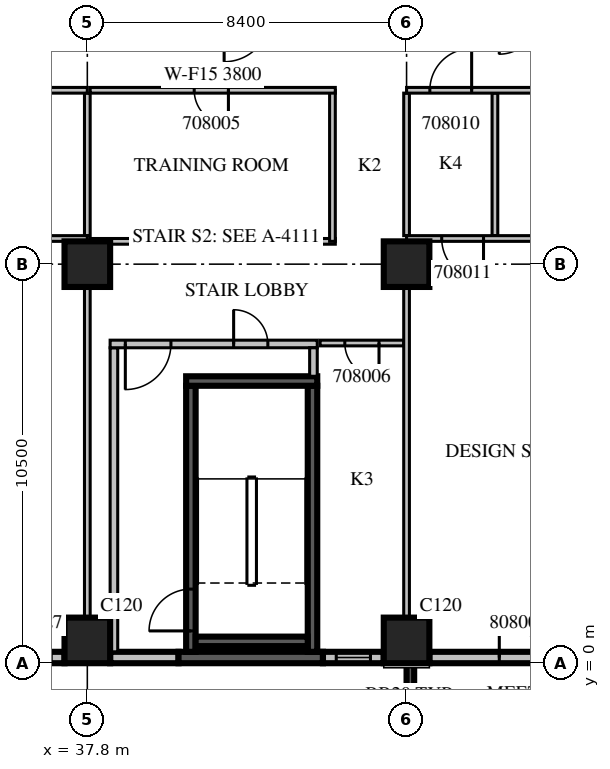
"""IFC4 building model, lengths in metres.
Left out: names, types, materials, properties, quantities, classifications, styles, units other than length and angle.
Written with IfcOpenShell. Run it as: python <this file> out.ifc"""

import sys

from ifc_helpers import new_model, si_unit, direction, frame, frame_2d, origin, origin_2d, place, context, subcontext, project, spatial, rectangle, extrude, source, transform, mapped, element, fill, save


model = new_model("IFC4")
c1 = context("Model", 3, precision=1e-05, world=origin(), true_north=direction((0.0, 1.0)))
c2 = subcontext(c1, "Body", "Model", "MODEL_VIEW")
j1 = project(units=[si_unit("LENGTHUNIT", "METRE"), si_unit("PLANEANGLEUNIT", "RADIAN")], contexts=[c1])
p1 = place(None, origin())
s1 = spatial("IfcSite", under=j1, at=p1, CompositionType="ELEMENT")
p2 = place(p1, origin())
s2 = spatial("IfcBuilding", under=s1, at=p2, CompositionType="ELEMENT")
p3 = place(p2, frame((0.0, 0.0, 44.7)))
s3 = spatial("IfcBuildingStorey", under=s2, at=p3, CompositionType="ELEMENT", Elevation=44.7)
m1 = source(origin(), c2, "Body", "SweptSolid", [
    extrude(rectangle(XDim=1.2, YDim=1.2, at=origin_2d()), origin(), (0.0, 0.0, 1.0), 4.2),
])
for number, where, z_axis, x_axis in (
    (1, (37.8, 0.6, 0.0), (0.0, 0.0, 1.0), (1.0, 0.0, 0.0)),
    (2, (46.2, 0.6, 0.0), (0.0, 0.0, 1.0), (1.0, 0.0, 0.0)),
    (3, (37.8, 10.5, 0.0), (0.0, 0.0, 1.0), (1.0, 0.0, 0.0)),
    (4, (46.2, 10.5, 0.0), (0.0, 0.0, 1.0), (1.0, 0.0, 0.0)),
):
    element("IfcColumn", number, at=place(p3, frame(where, z_axis=z_axis, x_axis=x_axis)), inside=s3, PredefinedType="COLUMN", context=c2, shape_type="MappedRepresentation", body=[
        mapped(m1, transform((0.0, 0.0, 0.0), scale=1.0)),
    ])
m2 = source(origin(), c2, "Body", "SweptSolid", [
    extrude(rectangle(XDim=1.6, YDim=0.3, at=frame_2d((0.8, 0.0))), origin(), (0.0, 0.0, 1.0), 3.8),
])
p4 = place(p3, frame((35.6, 0.15, 0.0), z_axis=(0.0, 0.0, 1.0), x_axis=(1.0, 0.0, 0.0)))
e5 = element("IfcWall", 5, at=p4, inside=s3, PredefinedType="STANDARD", context=c2, shape_type="MappedRepresentation", body=[
    mapped(m2, transform((0.0, 0.0, 0.0), scale=1.0)),
])
m3 = source(origin(), c2, "Body", "SweptSolid", [
    extrude(rectangle(XDim=0.9, YDim=2.7, at=frame_2d((0.45, 1.35))), frame((0.0, 0.16, 0.0), z_axis=(0.0, -1.0, 0.0), x_axis=(1.0, 0.0, 0.0)), (0.0, 0.0, 1.0), 0.32),
])
p5 = place(p4, frame((0.35, 0.0, 0.6)))
e6 = element("IfcOpeningElement", 6, at=p5, cuts=e5, PredefinedType="OPENING", context=c2, shape_type="MappedRepresentation", body=[
    mapped(m3, transform((0.0, 0.0, 0.0), scale=1.0)),
])
m4 = source(origin(), c2, "Body", "SweptSolid", [
    extrude(rectangle(XDim=1.8, YDim=0.3, at=frame_2d((0.9, 0.0))), origin(), (0.0, 0.0, 1.0), 3.8),
])
p6 = place(p3, frame((38.4, 0.15, 0.0), z_axis=(0.0, 0.0, 1.0), x_axis=(1.0, 0.0, 0.0)))
e7 = element("IfcWall", 7, at=p6, inside=s3, PredefinedType="STANDARD", context=c2, shape_type="MappedRepresentation", body=[
    mapped(m4, transform((0.0, 0.0, 0.0), scale=1.0)),
])
m5 = source(origin(), c2, "Body", "SweptSolid", [
    extrude(rectangle(XDim=3.8, YDim=0.3, at=frame_2d((1.9, 0.0))), origin(), (0.0, 0.0, 1.0), 3.8),
])
p7 = place(p3, frame((40.2, 0.15, 0.0), z_axis=(0.0, 0.0, 1.0), x_axis=(1.0, 0.0, 0.0)))
e8 = element("IfcWall", 8, at=p7, inside=s3, PredefinedType="SOLIDWALL", context=c2, shape_type="MappedRepresentation", body=[
    mapped(m5, transform((0.0, 0.0, 0.0), scale=1.0)),
])
p8 = place(p3, frame((44.0, 0.15, 0.0), z_axis=(0.0, 0.0, 1.0), x_axis=(1.0, 0.0, 0.0)))
e9 = element("IfcWall", 9, at=p8, inside=s3, PredefinedType="STANDARD", context=c2, shape_type="MappedRepresentation", body=[
    mapped(m2, transform((0.0, 0.0, 0.0), scale=1.0)),
])
p9 = place(p8, frame((0.35, 0.0, 0.6)))
e10 = element("IfcOpeningElement", 10, at=p9, cuts=e9, PredefinedType="OPENING", context=c2, shape_type="MappedRepresentation", body=[
    mapped(m3, transform((0.0, 0.0, 0.0), scale=1.0)),
])
m6 = source(origin(), c2, "Body", "SweptSolid", [
    extrude(rectangle(XDim=4.68, YDim=0.3, at=frame_2d((2.34, 0.0))), origin(), (0.0, 0.0, 1.0), 3.8),
])
p10 = place(p3, frame((46.8, 0.15, 0.0), z_axis=(0.0, 0.0, 1.0), x_axis=(1.0, 0.0, 0.0)))
e11 = element("IfcWall", 11, at=p10, inside=s3, PredefinedType="STANDARD", context=c2, shape_type="MappedRepresentation", body=[
    mapped(m6, transform((0.0, 0.0, 0.0), scale=1.0)),
])
m7 = source(origin(), c2, "Body", "SweptSolid", [
    extrude(rectangle(XDim=1.0, YDim=2.1, at=frame_2d((0.5, 1.05))), frame((0.0, 0.16, 0.0), z_axis=(0.0, -1.0, 0.0), x_axis=(1.0, 0.0, 0.0)), (0.0, 0.0, 1.0), 0.32),
])
p11 = place(p10, frame((1.84, 0.0, 0.0)))
e12 = element("IfcOpeningElement", 12, at=p11, cuts=e11, PredefinedType="OPENING", context=c2, shape_type="MappedRepresentation", body=[
    mapped(m7, transform((0.0, 0.0, 0.0), scale=1.0)),
])
p12 = place(p3, frame((46.3, 0.0, 0.0), z_axis=(0.0, 0.0, 1.0), x_axis=(0.0, -1.0, 0.0)))
e13 = element("IfcWall", 13, at=p12, inside=s3, PredefinedType="SOLIDWALL", context=c2, shape_type="SweptSolid", body=[
    extrude(rectangle(XDim=3.9, YDim=0.2, at=frame_2d((1.95, 0.0))), origin(), (0.0, 0.0, 1.0), 3.79),
])
p13 = place(p12, frame((0.75, 0.0, 0.6)))
e14 = element("IfcOpeningElement", 14, at=p13, cuts=e13, PredefinedType="OPENING", context=c2, shape_type="SweptSolid", body=[
    extrude(rectangle(XDim=2.4, YDim=2.7, at=frame_2d((1.2, 1.35))), frame((0.0, 0.11, 0.0), z_axis=(0.0, -1.0, 0.0), x_axis=(1.0, 0.0, 0.0)), (0.0, 0.0, 1.0), 0.22),
])
m8 = source(origin(), c2, "Body", "SweptSolid", [
    extrude(rectangle(XDim=7.0, YDim=0.25, at=frame_2d((3.5, 0.0))), origin(), (0.0, 0.0, 1.0), 3.8),
])
p14 = place(p3, frame((40.525, 0.3, 0.0), z_axis=(0.0, 0.0, 1.0), x_axis=(0.0, 1.0, 0.0)))
e15 = element("IfcWall", 15, at=p14, inside=s3, PredefinedType="SOLIDWALL", context=c2, shape_type="MappedRepresentation", body=[
    mapped(m8, transform((0.0, 0.0, 0.0), scale=1.0)),
])
m9 = source(origin(), c2, "Body", "SweptSolid", [
    extrude(rectangle(XDim=1.1, YDim=2.1, at=frame_2d((0.55, 1.05))), frame((0.0, 0.135, 0.0), z_axis=(0.0, -1.0, 0.0), x_axis=(1.0, 0.0, 0.0)), (0.0, 0.0, 1.0), 0.27),
])
p15 = place(p14, frame((0.55, 0.0, 0.0)))
e16 = element("IfcOpeningElement", 16, at=p15, cuts=e15, PredefinedType="OPENING", context=c2, shape_type="MappedRepresentation", body=[
    mapped(m9, transform((0.0, 0.0, 0.0), scale=1.0)),
])
p16 = place(p3, frame((43.725, 0.3, 0.0), z_axis=(0.0, 0.0, 1.0), x_axis=(0.0, 1.0, 0.0)))
e17 = element("IfcWall", 17, at=p16, inside=s3, PredefinedType="SOLIDWALL", context=c2, shape_type="MappedRepresentation", body=[
    mapped(m8, transform((0.0, 0.0, 0.0), scale=1.0)),
])
m10 = source(origin(), c2, "Body", "SweptSolid", [
    extrude(rectangle(XDim=3.45, YDim=0.25, at=frame_2d((1.725, 0.0))), origin(), (0.0, 0.0, 1.0), 3.8),
])
p17 = place(p3, frame((40.4, 7.425, 0.0), z_axis=(0.0, 0.0, 1.0), x_axis=(1.0, 0.0, 0.0)))
e18 = element("IfcWall", 18, at=p17, inside=s3, PredefinedType="SOLIDWALL", context=c2, shape_type="MappedRepresentation", body=[
    mapped(m10, transform((0.0, 0.0, 0.0), scale=1.0)),
])
m11 = source(origin(), c2, "Body", "SweptSolid", [
    extrude(rectangle(XDim=2.95, YDim=0.25, at=frame_2d((1.475, 0.0))), origin(), (0.0, 0.0, 1.0), 3.8),
])
p18 = place(p3, frame((40.65, 0.575, 0.0), z_axis=(0.0, 0.0, 1.0), x_axis=(1.0, 0.0, 0.0)))
e19 = element("IfcWall", 19, at=p18, inside=s3, PredefinedType="SOLIDWALL", context=c2, shape_type="MappedRepresentation", body=[
    mapped(m11, transform((0.0, 0.0, 0.0), scale=1.0)),
])
m12 = source(origin(), c2, "Body", "SweptSolid", [
    extrude(rectangle(XDim=8.0, YDim=0.2, at=frame_2d((4.0, 0.0))), origin(), (0.0, 0.0, 1.0), 3.8),
])
p19 = place(p3, frame((38.5, 0.3, 0.0), z_axis=(0.0, 0.0, 1.0), x_axis=(0.0, 1.0, 0.0)))
e20 = element("IfcWall", 20, at=p19, inside=s3, PredefinedType="PARTITIONING", context=c2, shape_type="MappedRepresentation", body=[
    mapped(m12, transform((0.0, 0.0, 0.0), scale=1.0)),
])
m13 = source(origin(), c2, "Body", "SweptSolid", [
    extrude(rectangle(XDim=5.45, YDim=0.2, at=frame_2d((2.725, 0.0))), origin(), (0.0, 0.0, 1.0), 3.8),
])
p20 = place(p3, frame((38.4, 8.4, 0.0), z_axis=(0.0, 0.0, 1.0), x_axis=(1.0, 0.0, 0.0)))
e21 = element("IfcWall", 21, at=p20, inside=s3, PredefinedType="PARTITIONING", context=c2, shape_type="MappedRepresentation", body=[
    mapped(m13, transform((0.0, 0.0, 0.0), scale=1.0)),
])
m14 = source(origin(), c2, "Body", "SweptSolid", [
    extrude(rectangle(XDim=1.2, YDim=2.1, at=frame_2d((0.6, 1.05))), frame((0.0, 0.11, 0.0), z_axis=(0.0, -1.0, 0.0), x_axis=(1.0, 0.0, 0.0)), (0.0, 0.0, 1.0), 0.22),
])
p21 = place(p20, frame((0.4, 0.0, 0.0)))
e22 = element("IfcOpeningElement", 22, at=p21, cuts=e21, PredefinedType="OPENING", context=c2, shape_type="MappedRepresentation", body=[
    mapped(m14, transform((0.0, 0.0, 0.0), scale=1.0)),
])
m15 = source(origin(), c2, "Body", "SweptSolid", [
    extrude(rectangle(XDim=0.9, YDim=2.1, at=frame_2d((0.45, 1.05))), frame((0.0, 0.11, 0.0), z_axis=(0.0, -1.0, 0.0), x_axis=(1.0, 0.0, 0.0)), (0.0, 0.0, 1.0), 0.22),
])
p22 = place(p20, frame((3.25, 0.0, 0.0)))
e23 = element("IfcOpeningElement", 23, at=p22, cuts=e21, PredefinedType="OPENING", context=c2, shape_type="MappedRepresentation", body=[
    mapped(m15, transform((0.0, 0.0, 0.0), scale=1.0)),
])
m16 = source(origin(), c2, "Body", "SweptSolid", [
    extrude(rectangle(XDim=0.75, YDim=0.2, at=frame_2d((0.375, 0.0))), origin(), (0.0, 0.0, 1.0), 3.8),
])
p23 = place(p3, frame((43.75, 7.55, 0.0), z_axis=(0.0, 0.0, 1.0), x_axis=(0.0, 1.0, 0.0)))
e24 = element("IfcWall", 24, at=p23, inside=s3, PredefinedType="PARTITIONING", context=c2, shape_type="MappedRepresentation", body=[
    mapped(m16, transform((0.0, 0.0, 0.0), scale=1.0)),
])
m17 = source(origin(), c2, "Body", "SweptSolid", [
    extrude(rectangle(XDim=6.45, YDim=0.15, at=frame_2d((3.225, 0.0))), origin(), (0.0, 0.0, 1.0), 3.8),
])
p24 = place(p3, frame((37.875, 11.1, 0.0), z_axis=(0.0, 0.0, 1.0), x_axis=(1.0, 0.0, 0.0)))
e25 = element("IfcWall", 25, at=p24, inside=s3, PredefinedType="PARTITIONING", context=c2, shape_type="MappedRepresentation", body=[
    mapped(m17, transform((0.0, 0.0, 0.0), scale=1.0)),
])
m18 = source(origin(), c2, "Body", "SweptSolid", [
    extrude(rectangle(XDim=3.975, YDim=0.15, at=frame_2d((1.988, 0.0))), origin(), (0.0, 0.0, 1.0), 3.8),
])
p25 = place(p3, frame((44.25, 11.1, 0.0), z_axis=(0.0, 0.0, 1.0), x_axis=(0.0, 1.0, 0.0)))
e26 = element("IfcWall", 26, at=p25, inside=s3, PredefinedType="PARTITIONING", context=c2, shape_type="MappedRepresentation", body=[
    mapped(m18, transform((0.0, 0.0, 0.0), scale=1.0)),
])
p26 = place(p3, frame((44.325, 15.075, 0.0), z_axis=(0.0, 0.0, 1.0), x_axis=(-1.0, 0.0, 0.0)))
e27 = element("IfcWall", 27, at=p26, inside=s3, PredefinedType="PARTITIONING", context=c2, shape_type="MappedRepresentation", body=[
    mapped(m17, transform((0.0, 0.0, 0.0), scale=1.0)),
])
m19 = source(origin(), c2, "Body", "SweptSolid", [
    extrude(rectangle(XDim=0.9, YDim=2.1, at=frame_2d((0.45, 1.05))), frame((0.0, 0.085, 0.0), z_axis=(0.0, -1.0, 0.0), x_axis=(1.0, 0.0, 0.0)), (0.0, 0.0, 1.0), 0.17),
])
p27 = place(p26, frame((2.812, 0.0, 0.0)))
e28 = element("IfcOpeningElement", 28, at=p27, cuts=e27, PredefinedType="OPENING", context=c2, shape_type="MappedRepresentation", body=[
    mapped(m19, transform((0.0, 0.0, 0.0), scale=1.0)),
])
m20 = source(origin(), c2, "Body", "SweptSolid", [
    extrude(rectangle(XDim=2.2, YDim=0.15, at=frame_2d((1.1, 0.0))), origin(), (0.0, 0.0, 1.0), 3.8),
])
p28 = place(p3, frame((46.125, 8.425, 0.0), z_axis=(0.0, 0.0, 1.0), x_axis=(-1.0, 0.0, 0.0)))
e29 = element("IfcWall", 29, at=p28, inside=s3, PredefinedType="PARTITIONING", context=c2, shape_type="MappedRepresentation", body=[
    mapped(m20, transform((0.0, 0.0, 0.0), scale=1.0)),
])
p29 = place(p28, frame((0.65, 0.0, 0.0)))
e30 = element("IfcOpeningElement", 30, at=p29, cuts=e29, PredefinedType="OPENING", context=c2, shape_type="MappedRepresentation", body=[
    mapped(m19, transform((0.0, 0.0, 0.0), scale=1.0)),
])
m21 = source(origin(), c2, "Body", "SweptSolid", [
    extrude(rectangle(XDim=8.702, YDim=0.15, at=frame_2d((4.351, 0.0))), origin(), (0.0, 0.0, 1.0), 3.8),
])
p30 = place(p3, frame((37.8, 1.199, 0.0), z_axis=(0.0, 0.0, 1.0), x_axis=(0.0, 1.0, 0.0)))
e31 = element("IfcWall", 31, at=p30, inside=s3, PredefinedType="PARTITIONING", context=c2, shape_type="MappedRepresentation", body=[
    mapped(m21, transform((0.0, 0.0, 0.0), scale=1.0)),
])
m22 = source(origin(), c2, "Body", "SweptSolid", [
    extrude(rectangle(XDim=3.75, YDim=0.15, at=frame_2d((1.875, 0.0))), origin(), (0.0, 0.0, 1.0), 3.8),
])
p31 = place(p3, frame((37.8, 11.25, 0.0), z_axis=(0.0, 0.0, 1.0), x_axis=(0.0, 1.0, 0.0)))
e32 = element("IfcWall", 32, at=p31, inside=s3, PredefinedType="PARTITIONING", context=c2, shape_type="MappedRepresentation", body=[
    mapped(m22, transform((0.0, 0.0, 0.0), scale=1.0)),
])
m23 = source(origin(), c2, "Body", "SweptSolid", [
    extrude(rectangle(XDim=8.4, YDim=0.15, at=frame_2d((4.2, 0.0))), origin(), (0.0, 0.0, 1.0), 3.8),
])
p32 = place(p3, frame((37.8, 11.175, 0.0), z_axis=(0.0, 0.0, 1.0), x_axis=(-1.0, 0.0, 0.0)))
e33 = element("IfcWall", 33, at=p32, inside=s3, PredefinedType="PARTITIONING", context=c2, shape_type="MappedRepresentation", body=[
    mapped(m23, transform((0.0, 0.0, 0.0), scale=1.0)),
])
p33 = place(p32, frame((5.537, 0.0, 0.0)))
e34 = element("IfcOpeningElement", 34, at=p33, cuts=e33, PredefinedType="OPENING", context=c2, shape_type="MappedRepresentation", body=[
    mapped(m19, transform((0.0, 0.0, 0.0), scale=1.0)),
])
p34 = place(p32, frame((1.913, 0.0, 0.0)))
e35 = element("IfcOpeningElement", 35, at=p34, cuts=e33, PredefinedType="OPENING", context=c2, shape_type="MappedRepresentation", body=[
    mapped(m19, transform((0.0, 0.0, 0.0), scale=1.0)),
])
p35 = place(p3, frame((48.525, 11.25, 0.0), z_axis=(0.0, 0.0, 1.0), x_axis=(0.0, 1.0, 0.0)))
e36 = element("IfcWall", 36, at=p35, inside=s3, PredefinedType="PARTITIONING", context=c2, shape_type="MappedRepresentation", body=[
    mapped(m22, transform((0.0, 0.0, 0.0), scale=1.0)),
])
p36 = place(p3, frame((46.2, 1.199, 0.0), z_axis=(0.0, 0.0, 1.0), x_axis=(0.0, 1.0, 0.0)))
e37 = element("IfcWall", 37, at=p36, inside=s3, PredefinedType="PARTITIONING", context=c2, shape_type="MappedRepresentation", body=[
    mapped(m21, transform((0.0, 0.0, 0.0), scale=1.0)),
])
p37 = place(p3, frame((46.2, 11.25, 0.0), z_axis=(0.0, 0.0, 1.0), x_axis=(0.0, 1.0, 0.0)))
e38 = element("IfcWall", 38, at=p37, inside=s3, PredefinedType="PARTITIONING", context=c2, shape_type="MappedRepresentation", body=[
    mapped(m22, transform((0.0, 0.0, 0.0), scale=1.0)),
])
p38 = place(p3, frame((71.1, 11.175, 0.0), z_axis=(0.0, 0.0, 1.0), x_axis=(-1.0, 0.0, 0.0)))
e39 = element("IfcWall", 39, at=p38, inside=s3, PredefinedType="PARTITIONING", context=c2, shape_type="SweptSolid", body=[
    extrude(rectangle(XDim=24.9, YDim=0.15, at=frame_2d((12.45, 0.0))), origin(), (0.0, 0.0, 1.0), 3.3),
])
m24 = source(origin(), c2, "Body", "SweptSolid", [
    extrude(rectangle(XDim=1.1, YDim=2.1, at=frame_2d((0.55, 1.05))), frame((0.0, 0.085, 0.0), z_axis=(0.0, -1.0, 0.0), x_axis=(1.0, 0.0, 0.0)), (0.0, 0.0, 1.0), 0.17),
])
p39 = place(p38, frame((22.875, 0.0, 0.0)))
e40 = element("IfcOpeningElement", 40, at=p39, cuts=e39, PredefinedType="OPENING", context=c2, shape_type="MappedRepresentation", body=[
    mapped(m24, transform((0.0, 0.0, 0.0), scale=1.0)),
])
p40 = place(p38, frame((15.633, 0.0, 0.0)))
e41 = element("IfcOpeningElement", 41, at=p40, cuts=e39, PredefinedType="OPENING", context=c2, shape_type="MappedRepresentation", body=[
    mapped(m19, transform((0.0, 0.0, 0.0), scale=1.0)),
])
p41 = place(p38, frame((9.752, 0.0, 0.0)))
e42 = element("IfcOpeningElement", 42, at=p41, cuts=e39, PredefinedType="OPENING", context=c2, shape_type="MappedRepresentation", body=[
    mapped(m19, transform((0.0, 0.0, 0.0), scale=1.0)),
])
p42 = place(p38, frame((4.607, 0.0, 0.0)))
e43 = element("IfcOpeningElement", 43, at=p42, cuts=e39, PredefinedType="OPENING", context=c2, shape_type="MappedRepresentation", body=[
    mapped(m19, transform((0.0, 0.0, 0.0), scale=1.0)),
])
p43 = place(p38, frame((2.243, 0.0, 0.0)))
e44 = element("IfcOpeningElement", 44, at=p43, cuts=e39, PredefinedType="OPENING", context=c2, shape_type="MappedRepresentation", body=[
    mapped(m19, transform((0.0, 0.0, 0.0), scale=1.0)),
])
p44 = place(p3, frame((37.8, 15.075, 0.0), z_axis=(0.0, 0.0, 1.0), x_axis=(-1.0, 0.0, 0.0)))
e45 = element("IfcWall", 45, at=p44, inside=s3, PredefinedType="PARTITIONING", context=c2, shape_type="MappedRepresentation", body=[
    mapped(m23, transform((0.0, 0.0, 0.0), scale=1.0)),
])
m25 = source(origin(), c2, "Body", "SweptSolid", [
    extrude(rectangle(XDim=1.2, YDim=2.1, at=frame_2d((0.6, 1.05))), frame((0.0, 0.085, 0.0), z_axis=(0.0, -1.0, 0.0), x_axis=(1.0, 0.0, 0.0)), (0.0, 0.0, 1.0), 0.17),
])
p45 = place(p44, frame((3.6, 0.0, 0.0)))
e46 = element("IfcOpeningElement", 46, at=p45, cuts=e45, PredefinedType="OPENING", context=c2, shape_type="MappedRepresentation", body=[
    mapped(m25, transform((0.0, 0.0, 0.0), scale=1.0)),
])
m26 = source(origin(), c2, "Body", "SweptSolid", [
    extrude(rectangle(XDim=24.9, YDim=0.15, at=frame_2d((12.45, 0.0))), origin(), (0.0, 0.0, 1.0), 3.3),
])
p46 = place(p3, frame((71.1, 15.075, 0.0), z_axis=(0.0, 0.0, 1.0), x_axis=(-1.0, 0.0, 0.0)))
e47 = element("IfcWall", 47, at=p46, inside=s3, PredefinedType="PARTITIONING", context=c2, shape_type="MappedRepresentation", body=[
    mapped(m26, transform((0.0, 0.0, 0.0), scale=1.0)),
])
p47 = place(p46, frame((23.188, 0.0, 0.0)))
e48 = element("IfcOpeningElement", 48, at=p47, cuts=e47, PredefinedType="OPENING", context=c2, shape_type="MappedRepresentation", body=[
    mapped(m24, transform((0.0, 0.0, 0.0), scale=1.0)),
])
p48 = place(p46, frame((20.348, 0.0, 0.0)))
e49 = element("IfcOpeningElement", 49, at=p48, cuts=e47, PredefinedType="OPENING", context=c2, shape_type="MappedRepresentation", body=[
    mapped(m19, transform((0.0, 0.0, 0.0), scale=1.0)),
])
p49 = place(p46, frame((12.54, 0.0, 0.0)))
e50 = element("IfcOpeningElement", 50, at=p49, cuts=e47, PredefinedType="OPENING", context=c2, shape_type="MappedRepresentation", body=[
    mapped(m25, transform((0.0, 0.0, 0.0), scale=1.0)),
])
p50 = place(p46, frame((2.993, 0.0, 0.0)))
e51 = element("IfcOpeningElement", 51, at=p50, cuts=e47, PredefinedType="OPENING", context=c2, shape_type="MappedRepresentation", body=[
    mapped(m25, transform((0.0, 0.0, 0.0), scale=1.0)),
])
m27 = source(origin(), c2, "Body", "SweptSolid", [
    extrude(rectangle(XDim=0.9, YDim=2.7, at=frame_2d((0.45, 1.35))), frame((0.0, 0.03, 0.0), z_axis=(0.0, -1.0, 0.0), x_axis=(1.0, 0.0, 0.0)), (0.0, 0.0, 1.0), 0.06),
])
p51 = place(p9, origin())
e52 = element("IfcWindow", 52, at=p51, inside=s3, PartitioningType="SINGLE_PANEL", PredefinedType="WINDOW", context=c2, shape_type="MappedRepresentation", body=[
    mapped(m27, transform((0.0, 0.0, 0.0), scale=1.0)),
])
fill(e10, e52)
m28 = source(origin(), c2, "Body", "SweptSolid", [
    extrude(rectangle(XDim=1.1, YDim=2.1, at=frame_2d((0.55, 1.05))), frame((0.0, 0.025, 0.0), z_axis=(0.0, -1.0, 0.0), x_axis=(1.0, 0.0, 0.0)), (0.0, 0.0, 1.0), 0.05),
])
p52 = place(p15, origin())
e53 = element("IfcDoor", 53, at=p52, inside=s3, OperationType="SINGLE_SWING_LEFT", PredefinedType="DOOR", context=c2, shape_type="MappedRepresentation", body=[
    mapped(m28, transform((0.0, 0.0, 0.0), scale=1.0)),
])
fill(e16, e53)
m29 = source(origin(), c2, "Body", "SweptSolid", [
    extrude(rectangle(XDim=1.2, YDim=2.1, at=frame_2d((0.6, 1.05))), frame((0.0, 0.025, 0.0), z_axis=(0.0, -1.0, 0.0), x_axis=(1.0, 0.0, 0.0)), (0.0, 0.0, 1.0), 0.05),
])
p53 = place(p21, origin())
e54 = element("IfcDoor", 54, at=p53, inside=s3, OperationType="SINGLE_SWING_RIGHT", PredefinedType="DOOR", context=c2, shape_type="MappedRepresentation", body=[
    mapped(m29, transform((0.0, 0.0, 0.0), scale=1.0)),
])
fill(e22, e54)
m30 = source(origin(), c2, "Body", "SweptSolid", [
    extrude(rectangle(XDim=0.9, YDim=2.1, at=frame_2d((0.45, 1.05))), frame((0.0, 0.025, 0.0), z_axis=(0.0, -1.0, 0.0), x_axis=(1.0, 0.0, 0.0)), (0.0, 0.0, 1.0), 0.05),
])
p54 = place(p22, origin())
e55 = element("IfcDoor", 55, at=p54, inside=s3, OperationType="SINGLE_SWING_LEFT", PredefinedType="DOOR", context=c2, shape_type="MappedRepresentation", body=[
    mapped(m30, transform((0.0, 0.0, 0.0), scale=1.0)),
])
fill(e23, e55)
p55 = place(p27, origin())
e56 = element("IfcDoor", 56, at=p55, inside=s3, OperationType="SINGLE_SWING_LEFT", PredefinedType="DOOR", context=c2, shape_type="MappedRepresentation", body=[
    mapped(m30, transform((0.0, 0.0, 0.0), scale=1.0)),
])
fill(e28, e56)
p56 = place(p29, origin())
e57 = element("IfcDoor", 57, at=p56, inside=s3, OperationType="SINGLE_SWING_LEFT", PredefinedType="DOOR", context=c2, shape_type="MappedRepresentation", body=[
    mapped(m30, transform((0.0, 0.0, 0.0), scale=1.0)),
])
fill(e30, e57)
p57 = place(p47, origin())
e58 = element("IfcDoor", 58, at=p57, inside=s3, OperationType="SINGLE_SWING_RIGHT", PredefinedType="DOOR", context=c2, shape_type="MappedRepresentation", body=[
    mapped(m28, transform((0.0, 0.0, 0.0), scale=1.0)),
])
fill(e48, e58)
p58 = place(p39, origin())
e59 = element("IfcDoor", 59, at=p58, inside=s3, OperationType="SINGLE_SWING_LEFT", PredefinedType="DOOR", context=c2, shape_type="MappedRepresentation", body=[
    mapped(m28, transform((0.0, 0.0, 0.0), scale=1.0)),
])
fill(e40, e59)
m31 = source(origin(), c2, "Body", "SweptSolid", [
    extrude(rectangle(XDim=1.0, YDim=2.1, at=frame_2d((0.5, 1.05))), frame((0.0, 0.025, 0.0), z_axis=(0.0, -1.0, 0.0), x_axis=(1.0, 0.0, 0.0)), (0.0, 0.0, 1.0), 0.05),
])
p59 = place(p11, origin())
e60 = element("IfcDoor", 60, at=p59, inside=s3, OperationType="SINGLE_SWING_LEFT", PredefinedType="DOOR", context=c2, shape_type="MappedRepresentation", body=[
    mapped(m31, transform((0.0, 0.0, 0.0), scale=1.0)),
])
fill(e12, e60)
save(model, sys.argv[1])
